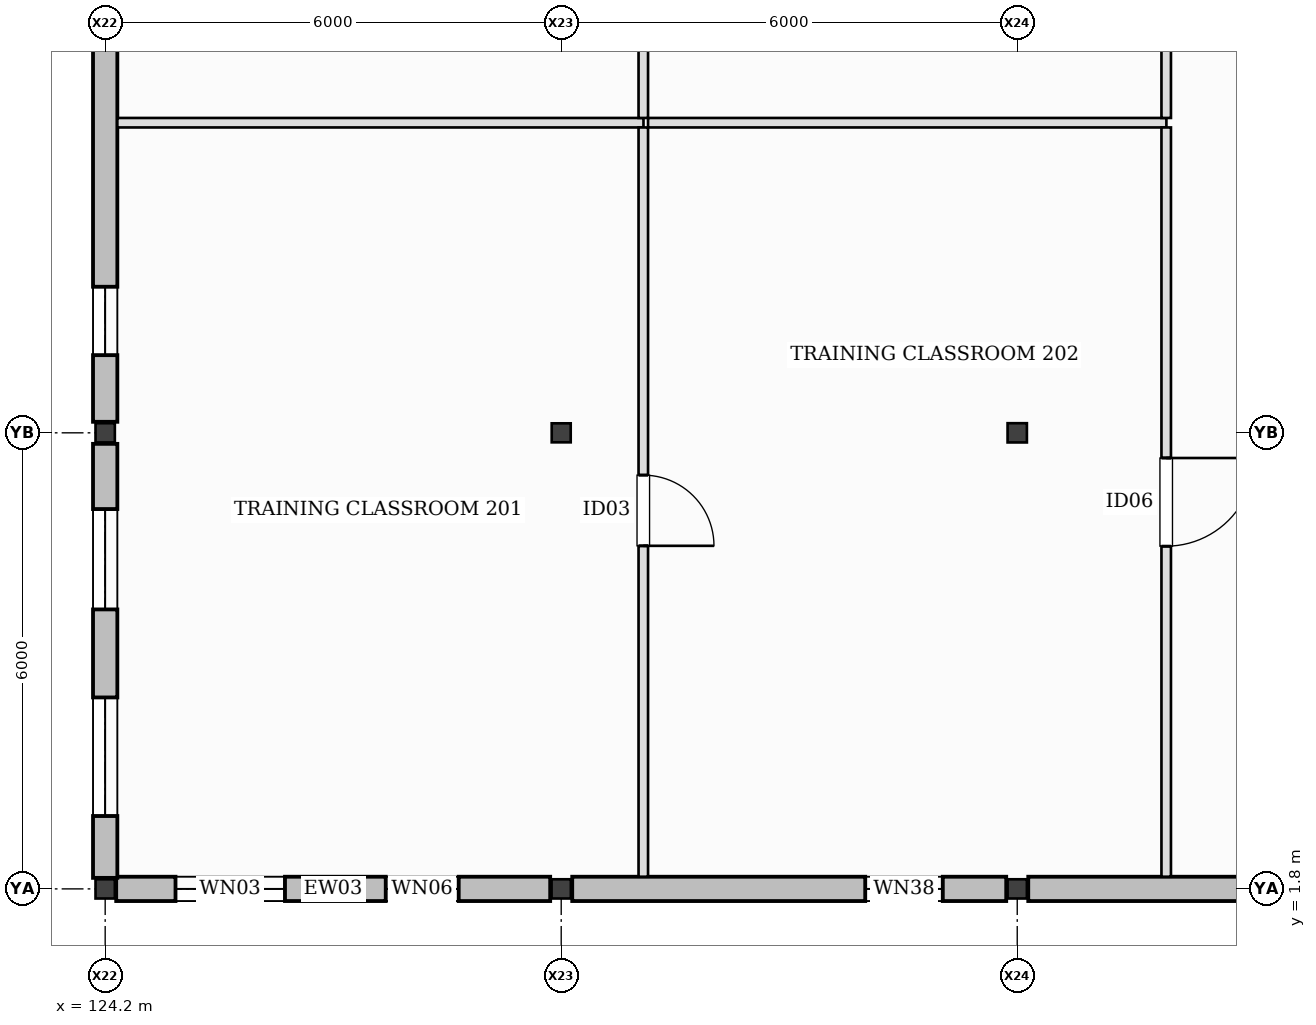
"""IFC4 building model, lengths in metres.
Left out: names, types, materials, properties, quantities, classifications, styles, units other than length and angle.
Written with IfcOpenShell. Run it as: python <this file> out.ifc"""

import sys

from ifc_helpers import new_model, si_unit, direction, frame, frame_2d, origin, origin_2d, place, context, subcontext, project, spatial, rectangle, hollow_rectangle, i_section, extrude, element, fill, save


model = new_model("IFC4")
c1 = context("Model", 3, precision=1e-05, world=origin(), true_north=direction((0.0, 1.0)))
c2 = subcontext(c1, "Body", "Model", "MODEL_VIEW")
j1 = project(units=[si_unit("LENGTHUNIT", "METRE"), si_unit("PLANEANGLEUNIT", "RADIAN")], contexts=[c1])
p1 = place(None, origin())
s1 = spatial("IfcSite", under=j1, at=p1, CompositionType="ELEMENT")
p2 = place(p1, origin())
s2 = spatial("IfcBuilding", under=s1, at=p2, CompositionType="ELEMENT")
p3 = place(p2, frame((0.0, 0.0, 6.0)))
s3 = spatial("IfcBuildingStorey", under=s2, at=p3, CompositionType="ELEMENT", Elevation=6.0)
for number, where, z_axis, x_axis in (
    (1, (124.2, 1.8, 0.0), (0.0, 0.0, 1.0), (1.0, 0.0, 0.0)),
    (2, (124.2, 7.8, 0.0), (0.0, 0.0, 1.0), (1.0, 0.0, 0.0)),
    (3, (130.2, 1.8, 0.0), (0.0, 0.0, 1.0), (1.0, 0.0, 0.0)),
):
    element("IfcColumn", number, at=place(p3, frame(where, z_axis=z_axis, x_axis=x_axis)), inside=s3, PredefinedType="COLUMN", context=c2, shape_type="SweptSolid", body=[
        extrude(i_section(OverallWidth=0.254, OverallDepth=0.253, WebThickness=0.009, FlangeThickness=0.014, at=origin_2d()), origin(), (0.0, 0.0, 1.0), 4.0),
    ])
p4 = place(p3, frame((130.2, 7.8, 0.0), z_axis=(0.0, 0.0, 1.0), x_axis=(1.0, 0.0, 0.0)))
e4 = element("IfcColumn", 4, at=p4, inside=s3, PredefinedType="COLUMN", context=c2, shape_type="SweptSolid", body=[
    extrude(hollow_rectangle(XDim=0.25, YDim=0.25, WallThickness=0.012, at=origin_2d()), origin(), (0.0, 0.0, 1.0), 4.0),
])
for number, where, z_axis, x_axis in (
    (5, (136.2, 1.8, 0.0), (0.0, 0.0, 1.0), (1.0, 0.0, 0.0)),
    (6, (136.2, 7.8, 0.0), (0.0, 0.0, 1.0), (1.0, 0.0, 0.0)),
):
    element("IfcColumn", number, at=place(p3, frame(where, z_axis=z_axis, x_axis=x_axis)), inside=s3, PredefinedType="COLUMN", context=c2, shape_type="SweptSolid", body=[
        extrude(i_section(OverallWidth=0.254, OverallDepth=0.253, WebThickness=0.009, FlangeThickness=0.014, at=origin_2d()), origin(), (0.0, 0.0, 1.0), 4.0),
    ])
p5 = place(p3, frame((124.345, 1.8, 0.0), z_axis=(0.0, 0.0, 1.0), x_axis=(1.0, 0.0, 0.0)))
e7 = element("IfcWall", 7, at=p5, inside=s3, PredefinedType="STANDARD", context=c2, shape_type="SweptSolid", body=[
    extrude(rectangle(XDim=5.71, YDim=0.32, at=frame_2d((2.855, 0.0))), origin(), (0.0, 0.0, 1.0), 3.223),
])
p6 = place(p5, frame((0.78, 0.0, 1.18)))
e8 = element("IfcOpeningElement", 8, at=p6, cuts=e7, PredefinedType="OPENING", context=c2, shape_type="SweptSolid", body=[
    extrude(rectangle(XDim=1.44, YDim=1.44, at=frame_2d((0.72, 0.72))), frame((0.0, 0.17, 0.0), z_axis=(0.0, -1.0, 0.0), x_axis=(1.0, 0.0, 0.0)), (0.0, 0.0, 1.0), 0.34),
])
p7 = place(p5, frame((3.546, 0.0, 0.96)))
e9 = element("IfcOpeningElement", 9, at=p7, cuts=e7, PredefinedType="OPENING", context=c2, shape_type="SweptSolid", body=[
    extrude(rectangle(XDim=0.96, YDim=0.96, at=frame_2d((0.48, 0.48))), frame((0.0, 0.17, 0.0), z_axis=(0.0, -1.0, 0.0), x_axis=(1.0, 0.0, 0.0)), (0.0, 0.0, 1.0), 0.34),
])
p8 = place(p3, frame((130.345, 1.8, 0.0), z_axis=(0.0, 0.0, 1.0), x_axis=(1.0, 0.0, 0.0)))
e10 = element("IfcWall", 10, at=p8, inside=s3, PredefinedType="STANDARD", context=c2, shape_type="SweptSolid", body=[
    extrude(rectangle(XDim=5.71, YDim=0.32, at=frame_2d((2.855, 0.0))), origin(), (0.0, 0.0, 1.0), 3.223),
])
p9 = place(p8, frame((3.855, 0.0, 1.28)))
e11 = element("IfcOpeningElement", 11, at=p9, cuts=e10, PredefinedType="OPENING", context=c2, shape_type="SweptSolid", body=[
    extrude(rectangle(XDim=1.02, YDim=1.02, at=frame_2d((0.51, 0.51))), frame((0.0, 0.17, 0.0), z_axis=(0.0, -1.0, 0.0), x_axis=(1.0, 0.0, 0.0)), (0.0, 0.0, 1.0), 0.34),
])
p10 = place(p3, frame((136.345, 1.8, 0.0), z_axis=(0.0, 0.0, 1.0), x_axis=(1.0, 0.0, 0.0)))
e12 = element("IfcWall", 12, at=p10, inside=s3, PredefinedType="STANDARD", context=c2, shape_type="SweptSolid", body=[
    extrude(rectangle(XDim=5.71, YDim=0.32, at=frame_2d((2.855, 0.0))), origin(), (0.0, 0.0, 1.0), 3.223),
])
p11 = place(p10, frame((3.504, 0.0, 0.86)))
e13 = element("IfcOpeningElement", 13, at=p11, cuts=e12, PredefinedType="OPENING", context=c2, shape_type="SweptSolid", body=[
    extrude(rectangle(XDim=1.08, YDim=1.08, at=frame_2d((0.54, 0.54))), frame((0.0, 0.17, 0.0), z_axis=(0.0, -1.0, 0.0), x_axis=(1.0, 0.0, 0.0)), (0.0, 0.0, 1.0), 0.34),
])
p12 = place(p3, frame((124.2, 7.655, 0.0), z_axis=(0.0, 0.0, 1.0), x_axis=(0.0, -1.0, 0.0)))
e14 = element("IfcWall", 14, at=p12, inside=s3, PredefinedType="STANDARD", context=c2, shape_type="SweptSolid", body=[
    extrude(rectangle(XDim=5.71, YDim=0.32, at=frame_2d((2.855, 0.0))), origin(), (0.0, 0.0, 1.0), 3.227),
])
p13 = place(p12, frame((0.858, 0.0, 1.18)))
e15 = element("IfcOpeningElement", 15, at=p13, cuts=e14, PredefinedType="OPENING", context=c2, shape_type="SweptSolid", body=[
    extrude(rectangle(XDim=1.32, YDim=1.32, at=frame_2d((0.66, 0.66))), frame((0.0, 0.17, 0.0), z_axis=(0.0, -1.0, 0.0), x_axis=(1.0, 0.0, 0.0)), (0.0, 0.0, 1.0), 0.34),
])
p14 = place(p12, frame((3.336, 0.0, 0.96)))
e16 = element("IfcOpeningElement", 16, at=p14, cuts=e14, PredefinedType="OPENING", context=c2, shape_type="SweptSolid", body=[
    extrude(rectangle(XDim=1.56, YDim=1.56, at=frame_2d((0.78, 0.78))), frame((0.0, 0.17, 0.0), z_axis=(0.0, -1.0, 0.0), x_axis=(1.0, 0.0, 0.0)), (0.0, 0.0, 1.0), 0.34),
])
p15 = place(p3, frame((124.2, 13.655, 0.0), z_axis=(0.0, 0.0, 1.0), x_axis=(0.0, -1.0, 0.0)))
e17 = element("IfcWall", 17, at=p15, inside=s3, PredefinedType="STANDARD", context=c2, shape_type="SweptSolid", body=[
    extrude(rectangle(XDim=5.71, YDim=0.32, at=frame_2d((2.855, 0.0))), origin(), (0.0, 0.0, 1.0), 3.227),
])
p16 = place(p15, frame((3.933, 0.0, 1.28)))
e18 = element("IfcOpeningElement", 18, at=p16, cuts=e17, PredefinedType="OPENING", context=c2, shape_type="SweptSolid", body=[
    extrude(rectangle(XDim=0.9, YDim=0.9, at=frame_2d((0.45, 0.45))), frame((0.0, 0.17, 0.0), z_axis=(0.0, -1.0, 0.0), x_axis=(1.0, 0.0, 0.0)), (0.0, 0.0, 1.0), 0.34),
])
p17 = place(p3, frame((124.36, 11.88, 0.0), z_axis=(0.0, 0.0, 1.0), x_axis=(1.0, 0.0, 0.0)))
e19 = element("IfcWall", 19, at=p17, inside=s3, PredefinedType="PARTITIONING", context=c2, shape_type="SweptSolid", body=[
    extrude(rectangle(XDim=6.922, YDim=0.125, at=frame_2d((3.461, 0.0))), origin(), (0.0, 0.0, 1.0), 3.72),
])
p18 = place(p3, frame((131.28, 11.817, 0.0), z_axis=(0.0, 0.0, 1.0), x_axis=(0.0, -1.0, 0.0)))
e20 = element("IfcWall", 20, at=p18, inside=s3, PredefinedType="PARTITIONING", context=c2, shape_type="SweptSolid", body=[
    extrude(rectangle(XDim=9.857, YDim=0.125, at=frame_2d((4.929, 0.0))), origin(), (0.0, 0.0, 1.0), 3.72),
])
p19 = place(p18, frame((4.574, 0.0, 0.0)))
e21 = element("IfcOpeningElement", 21, at=p19, cuts=e20, PredefinedType="OPENING", context=c2, shape_type="SweptSolid", body=[
    extrude(rectangle(XDim=0.93, YDim=2.1, at=frame_2d((0.465, 1.05))), frame((0.0, 0.073, 0.0), z_axis=(0.0, -1.0, 0.0), x_axis=(1.0, 0.0, 0.0)), (0.0, 0.0, 1.0), 0.145),
])
p20 = place(p3, frame((131.343, 11.88, 0.0), z_axis=(0.0, 0.0, 1.0), x_axis=(1.0, 0.0, 0.0)))
e22 = element("IfcWall", 22, at=p20, inside=s3, PredefinedType="PARTITIONING", context=c2, shape_type="SweptSolid", body=[
    extrude(rectangle(XDim=6.82, YDim=0.125, at=frame_2d((3.41, 0.0))), origin(), (0.0, 0.0, 1.0), 3.72),
])
p21 = place(p3, frame((138.16, 11.817, 0.0), z_axis=(0.0, 0.0, 1.0), x_axis=(0.0, -1.0, 0.0)))
e23 = element("IfcWall", 23, at=p21, inside=s3, PredefinedType="PARTITIONING", context=c2, shape_type="SweptSolid", body=[
    extrude(rectangle(XDim=9.857, YDim=0.125, at=frame_2d((4.929, 0.0))), origin(), (0.0, 0.0, 1.0), 3.449),
])
p22 = place(p21, frame((4.349, 0.0, 0.0)))
e24 = element("IfcOpeningElement", 24, at=p22, cuts=e23, PredefinedType="OPENING", context=c2, shape_type="SweptSolid", body=[
    extrude(rectangle(XDim=1.16, YDim=2.2, at=frame_2d((0.58, 1.1))), frame((0.0, 0.073, 0.0), z_axis=(0.0, -1.0, 0.0), x_axis=(1.0, 0.0, 0.0)), (0.0, 0.0, 1.0), 0.145),
])
p23 = place(p3, frame((131.28, 24.097, 0.0), z_axis=(0.0, 0.0, 1.0), x_axis=(0.0, -1.0, 0.0)))
e25 = element("IfcWall", 25, at=p23, inside=s3, PredefinedType="PARTITIONING", context=c2, shape_type="SweptSolid", body=[
    extrude(rectangle(XDim=12.155, YDim=0.125, at=frame_2d((6.078, 0.0))), origin(), (0.0, 0.0, 1.0), 3.72),
])
p24 = place(p3, frame((138.16, 24.167, 0.0), z_axis=(0.0, 0.0, 1.0), x_axis=(0.0, -1.0, 0.0)))
e26 = element("IfcWall", 26, at=p24, inside=s3, PredefinedType="PARTITIONING", context=c2, shape_type="SweptSolid", body=[
    extrude(rectangle(XDim=12.225, YDim=0.125, at=frame_2d((6.113, 0.0))), origin(), (0.0, 0.0, 1.0), 3.289),
])
p25 = place(p6, origin())
e27 = element("IfcWindow", 27, at=p25, inside=s3, PartitioningType="SINGLE_PANEL", PredefinedType="WINDOW", context=c2, shape_type="SweptSolid", body=[
    extrude(rectangle(XDim=1.44, YDim=1.44, at=frame_2d((0.72, 0.72))), frame((0.0, 0.03, 0.0), z_axis=(0.0, -1.0, 0.0), x_axis=(1.0, 0.0, 0.0)), (0.0, 0.0, 1.0), 0.06),
])
fill(e8, e27)
p26 = place(p7, origin())
e28 = element("IfcWindow", 28, at=p26, inside=s3, PartitioningType="SINGLE_PANEL", PredefinedType="WINDOW", context=c2, shape_type="SweptSolid", body=[
    extrude(rectangle(XDim=0.96, YDim=0.96, at=frame_2d((0.48, 0.48))), frame((0.0, 0.03, 0.0), z_axis=(0.0, -1.0, 0.0), x_axis=(1.0, 0.0, 0.0)), (0.0, 0.0, 1.0), 0.06),
])
fill(e9, e28)
p27 = place(p9, origin())
e29 = element("IfcWindow", 29, at=p27, inside=s3, PartitioningType="SINGLE_PANEL", PredefinedType="WINDOW", context=c2, shape_type="SweptSolid", body=[
    extrude(rectangle(XDim=1.02, YDim=1.02, at=frame_2d((0.51, 0.51))), frame((0.0, 0.03, 0.0), z_axis=(0.0, -1.0, 0.0), x_axis=(1.0, 0.0, 0.0)), (0.0, 0.0, 1.0), 0.06),
])
fill(e11, e29)
p28 = place(p13, origin())
e30 = element("IfcWindow", 30, at=p28, inside=s3, PartitioningType="SINGLE_PANEL", PredefinedType="WINDOW", context=c2, shape_type="SweptSolid", body=[
    extrude(rectangle(XDim=1.32, YDim=1.32, at=frame_2d((0.66, 0.66))), frame((0.0, 0.03, 0.0), z_axis=(0.0, -1.0, 0.0), x_axis=(1.0, 0.0, 0.0)), (0.0, 0.0, 1.0), 0.06),
])
fill(e15, e30)
p29 = place(p14, origin())
e31 = element("IfcWindow", 31, at=p29, inside=s3, PartitioningType="SINGLE_PANEL", PredefinedType="WINDOW", context=c2, shape_type="SweptSolid", body=[
    extrude(rectangle(XDim=1.56, YDim=1.56, at=frame_2d((0.78, 0.78))), frame((0.0, 0.03, 0.0), z_axis=(0.0, -1.0, 0.0), x_axis=(1.0, 0.0, 0.0)), (0.0, 0.0, 1.0), 0.06),
])
fill(e16, e31)
p30 = place(p16, origin())
e32 = element("IfcWindow", 32, at=p30, inside=s3, PartitioningType="SINGLE_PANEL", PredefinedType="WINDOW", context=c2, shape_type="SweptSolid", body=[
    extrude(rectangle(XDim=0.9, YDim=0.9, at=frame_2d((0.45, 0.45))), frame((0.0, 0.03, 0.0), z_axis=(0.0, -1.0, 0.0), x_axis=(1.0, 0.0, 0.0)), (0.0, 0.0, 1.0), 0.06),
])
fill(e18, e32)
p31 = place(p19, frame((0.93, 0.0, 0.0), z_axis=(0.0, 0.0, 1.0), x_axis=(-1.0, 0.0, 0.0)))
e33 = element("IfcDoor", 33, at=p31, inside=s3, OperationType="SINGLE_SWING_RIGHT", PredefinedType="DOOR", context=c2, shape_type="SweptSolid", body=[
    extrude(rectangle(XDim=0.93, YDim=2.1, at=frame_2d((0.465, 1.05))), frame((0.0, 0.025, 0.0), z_axis=(0.0, -1.0, 0.0), x_axis=(1.0, 0.0, 0.0)), (0.0, 0.0, 1.0), 0.05),
])
fill(e21, e33)
p32 = place(p22, frame((1.16, 0.0, 0.0), z_axis=(0.0, 0.0, 1.0), x_axis=(-1.0, 0.0, 0.0)))
e34 = element("IfcDoor", 34, at=p32, inside=s3, OperationType="SINGLE_SWING_LEFT", PredefinedType="DOOR", context=c2, shape_type="SweptSolid", body=[
    extrude(rectangle(XDim=1.16, YDim=2.2, at=frame_2d((0.58, 1.1))), frame((0.0, 0.025, 0.0), z_axis=(0.0, -1.0, 0.0), x_axis=(1.0, 0.0, 0.0)), (0.0, 0.0, 1.0), 0.05),
])
fill(e24, e34)
save(model, sys.argv[1])
